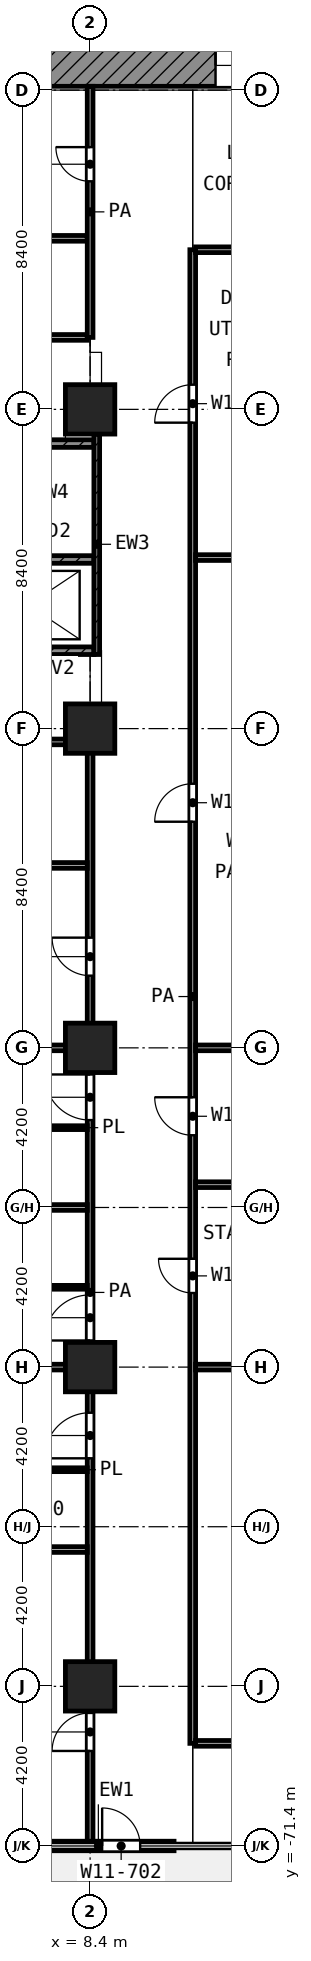
"""IFC4 building model, lengths in metres.
Left out: names, types, materials, properties, quantities, classifications, styles, units other than length and angle.
Written with IfcOpenShell. Run it as: python <this file> out.ifc"""

import sys

from ifc_helpers import new_model, si_unit, direction, frame, frame_2d, origin, origin_2d, place, context, subcontext, project, spatial, rectangle, extrude, element, fill, save


model = new_model("IFC4")
c1 = context("Model", 3, precision=1e-05, world=origin(), true_north=direction((0.0, 1.0)))
c2 = subcontext(c1, "Body", "Model", "MODEL_VIEW")
j1 = project(units=[si_unit("LENGTHUNIT", "METRE"), si_unit("PLANEANGLEUNIT", "RADIAN")], contexts=[c1])
p1 = place(None, origin())
s1 = spatial("IfcSite", under=j1, at=p1, CompositionType="ELEMENT")
p2 = place(p1, origin())
s2 = spatial("IfcBuilding", under=s1, at=p2, CompositionType="ELEMENT")
p3 = place(p2, frame((0.0, 0.0, 72.8)))
s3 = spatial("IfcBuildingStorey", under=s2, at=p3, CompositionType="ELEMENT", Elevation=72.8)
for number, where, z_axis, x_axis in (
    (1, (8.4, -33.6, 0.0), (0.0, 0.0, 1.0), (1.0, 0.0, 0.0)),
    (2, (8.4, -42.0, 0.0), (0.0, 0.0, 1.0), (1.0, 0.0, 0.0)),
    (3, (8.4, -50.4, 0.0), (0.0, 0.0, 1.0), (1.0, 0.0, 0.0)),
    (4, (8.4, -58.8, 0.0), (0.0, 0.0, 1.0), (1.0, 0.0, 0.0)),
    (5, (8.4, -67.2, 0.0), (0.0, 0.0, 1.0), (1.0, 0.0, 0.0)),
):
    element("IfcColumn", number, at=place(p3, frame(where, z_axis=z_axis, x_axis=x_axis)), inside=s3, PredefinedType="COLUMN", context=c2, shape_type="SweptSolid", body=[
        extrude(rectangle(XDim=1.3, YDim=1.3, at=origin_2d()), origin(), (0.0, 0.0, 1.0), 4.2),
    ])
p4 = place(p3, frame((6.625, -71.4, 0.0), z_axis=(0.0, 0.0, 1.0), x_axis=(1.0, 0.0, 0.0)))
e6 = element("IfcWall", 6, at=p4, inside=s3, PredefinedType="SOLIDWALL", context=c2, shape_type="SweptSolid", body=[
    extrude(rectangle(XDim=3.983, YDim=0.25, at=frame_2d((1.992, 0.0))), origin(), (0.0, 0.0, 1.0), 3.78),
])
p5 = place(p4, frame((2.092, 0.0, 0.0)))
e7 = element("IfcOpeningElement", 7, at=p5, cuts=e6, PredefinedType="OPENING", context=c2, shape_type="SweptSolid", body=[
    extrude(rectangle(XDim=1.0, YDim=2.1, at=frame_2d((0.5, 1.05))), frame((0.0, 0.135, 0.0), z_axis=(0.0, -1.0, 0.0), x_axis=(1.0, 0.0, 0.0)), (0.0, 0.0, 1.0), 0.27),
])
p6 = place(p3, frame((5.4, -24.55, 0.0), z_axis=(0.0, 0.0, 1.0), x_axis=(1.0, 0.0, 0.0)))
e8 = element("IfcWall", 8, at=p6, inside=s3, PredefinedType="SHEAR", context=c2, shape_type="SweptSolid", body=[
    extrude(rectangle(XDim=18.6, YDim=1.1, at=frame_2d((9.3, 0.0))), origin(), (0.0, 0.0, 1.0), 3.9),
])
p7 = place(p6, frame((6.3, 0.0, 0.0)))
e9 = element("IfcOpeningElement", 9, at=p7, cuts=e8, PredefinedType="OPENING", context=c2, shape_type="SweptSolid", body=[
    extrude(rectangle(XDim=1.8, YDim=2.1, at=frame_2d((0.9, 1.05))), frame((0.0, 0.56, 0.0), z_axis=(0.0, -1.0, 0.0), x_axis=(1.0, 0.0, 0.0)), (0.0, 0.0, 1.0), 1.12),
])
p8 = place(p3, frame((8.575, -40.05, 0.0), z_axis=(0.0, 0.0, 1.0), x_axis=(0.0, 1.0, 0.0)))
e10 = element("IfcWall", 10, at=p8, inside=s3, PredefinedType="SHEAR", context=c2, shape_type="SweptSolid", body=[
    extrude(rectangle(XDim=5.8, YDim=0.15, at=frame_2d((2.9, 0.0))), origin(), (0.0, 0.0, 1.0), 3.9),
])
p9 = place(p3, frame((0.45, -34.5, 0.0), z_axis=(0.0, 0.0, 1.0), x_axis=(1.0, 0.0, 0.0)))
e11 = element("IfcWall", 11, at=p9, inside=s3, PredefinedType="SHEAR", context=c2, shape_type="SweptSolid", body=[
    extrude(rectangle(XDim=8.05, YDim=0.2, at=frame_2d((4.025, 0.0))), origin(), (0.0, 0.0, 1.0), 3.9),
])
p10 = place(p9, frame((0.75, 0.0, 0.0)))
e12 = element("IfcOpeningElement", 12, at=p10, cuts=e11, PredefinedType="OPENING", context=c2, shape_type="SweptSolid", body=[
    extrude(rectangle(XDim=1.1, YDim=2.1, at=frame_2d((0.55, 1.05))), frame((0.0, 0.11, 0.0), z_axis=(0.0, -1.0, 0.0), x_axis=(1.0, 0.0, 0.0)), (0.0, 0.0, 1.0), 0.22),
])
p11 = place(p3, frame((0.45, -37.55, 0.0), z_axis=(0.0, 0.0, 1.0), x_axis=(1.0, 0.0, 0.0)))
e13 = element("IfcWall", 13, at=p11, inside=s3, PredefinedType="SHEAR", context=c2, shape_type="SweptSolid", body=[
    extrude(rectangle(XDim=8.05, YDim=0.2, at=frame_2d((4.025, 0.0))), origin(), (0.0, 0.0, 1.0), 3.9),
])
p12 = place(p11, frame((0.1, 0.0, 0.0)))
e14 = element("IfcOpeningElement", 14, at=p12, cuts=e13, PredefinedType="OPENING", context=c2, shape_type="SweptSolid", body=[
    extrude(rectangle(XDim=1.1, YDim=2.1, at=frame_2d((0.55, 1.05))), frame((0.0, 0.11, 0.0), z_axis=(0.0, -1.0, 0.0), x_axis=(1.0, 0.0, 0.0)), (0.0, 0.0, 1.0), 0.22),
])
p13 = place(p3, frame((0.45, -39.95, 0.0), z_axis=(0.0, 0.0, 1.0), x_axis=(1.0, 0.0, 0.0)))
e15 = element("IfcWall", 15, at=p13, inside=s3, PredefinedType="SHEAR", context=c2, shape_type="SweptSolid", body=[
    extrude(rectangle(XDim=8.05, YDim=0.2, at=frame_2d((4.025, 0.0))), origin(), (0.0, 0.0, 1.0), 3.9),
])
p14 = place(p13, frame((2.0, 0.0, 0.0)))
e16 = element("IfcOpeningElement", 16, at=p14, cuts=e15, PredefinedType="OPENING", context=c2, shape_type="SweptSolid", body=[
    extrude(rectangle(XDim=1.1, YDim=2.1, at=frame_2d((0.55, 1.05))), frame((0.0, 0.11, 0.0), z_axis=(0.0, -1.0, 0.0), x_axis=(1.0, 0.0, 0.0)), (0.0, 0.0, 1.0), 0.22),
])
p15 = place(p3, frame((5.15, -61.5, 0.0), z_axis=(0.0, 0.0, 1.0), x_axis=(1.0, 0.0, 0.0)))
e17 = element("IfcWall", 17, at=p15, inside=s3, PredefinedType="PARTITIONING", context=c2, shape_type="SweptSolid", body=[
    extrude(rectangle(XDim=3.175, YDim=0.1, at=frame_2d((1.587, 0.0))), origin(), (0.0, 0.0, 1.0), 3.9),
])
for number, where, z_axis, x_axis in (
    (18, (5.75, -56.7, 0.0), (0.0, 0.0, 1.0), (1.0, 0.0, 0.0)),
    (19, (5.75, -52.5, 0.0), (0.0, 0.0, 1.0), (1.0, 0.0, 0.0)),
):
    element("IfcWall", number, at=place(p3, frame(where, z_axis=z_axis, x_axis=x_axis)), inside=s3, PredefinedType="PARTITIONING", context=c2, shape_type="SweptSolid", body=[
        extrude(rectangle(XDim=2.575, YDim=0.1, at=frame_2d((1.288, 0.0))), origin(), (0.0, 0.0, 1.0), 3.9),
    ])
p16 = place(p3, frame((11.175, -68.7, 0.0), z_axis=(0.0, 0.0, 1.0), x_axis=(1.0, 0.0, 0.0)))
e20 = element("IfcWall", 20, at=p16, inside=s3, PredefinedType="PARTITIONING", context=c2, shape_type="SweptSolid", body=[
    extrude(rectangle(XDim=2.85, YDim=0.15, at=frame_2d((1.425, 0.0))), origin(), (0.0, 0.0, 1.0), 3.9),
])
for number, where, z_axis, x_axis in (
    (21, (0.08, -63.6, 0.0), (0.0, 0.0, 1.0), (1.0, 0.0, 0.0)),
    (22, (0.08, -58.8, 0.0), (0.0, 0.0, 1.0), (1.0, 0.0, 0.0)),
):
    element("IfcWall", number, at=place(p3, frame(where, z_axis=z_axis, x_axis=x_axis)), inside=s3, PredefinedType="PARTITIONING", context=c2, shape_type="SweptSolid", body=[
        extrude(rectangle(XDim=8.245, YDim=0.15, at=frame_2d((4.123, 0.0))), origin(), (0.0, 0.0, 1.0), 3.9),
    ])
p17 = place(p3, frame((11.175, -58.8, 0.0), z_axis=(0.0, 0.0, 1.0), x_axis=(1.0, 0.0, 0.0)))
e23 = element("IfcWall", 23, at=p17, inside=s3, PredefinedType="PARTITIONING", context=c2, shape_type="SweptSolid", body=[
    extrude(rectangle(XDim=2.85, YDim=0.15, at=frame_2d((1.425, 0.0))), origin(), (0.0, 0.0, 1.0), 3.9),
])
p18 = place(p3, frame((0.08, -54.6, 0.0), z_axis=(0.0, 0.0, 1.0), x_axis=(1.0, 0.0, 0.0)))
e24 = element("IfcWall", 24, at=p18, inside=s3, PredefinedType="PARTITIONING", context=c2, shape_type="SweptSolid", body=[
    extrude(rectangle(XDim=8.245, YDim=0.15, at=frame_2d((4.123, 0.0))), origin(), (0.0, 0.0, 1.0), 3.9),
])
p19 = place(p3, frame((11.175, -54.0, 0.0), z_axis=(0.0, 0.0, 1.0), x_axis=(1.0, 0.0, 0.0)))
e25 = element("IfcWall", 25, at=p19, inside=s3, PredefinedType="PARTITIONING", context=c2, shape_type="SweptSolid", body=[
    extrude(rectangle(XDim=2.85, YDim=0.15, at=frame_2d((1.425, 0.0))), origin(), (0.0, 0.0, 1.0), 3.9),
])
p20 = place(p3, frame((0.08, -50.4, 0.0), z_axis=(0.0, 0.0, 1.0), x_axis=(1.0, 0.0, 0.0)))
e26 = element("IfcWall", 26, at=p20, inside=s3, PredefinedType="PARTITIONING", context=c2, shape_type="SweptSolid", body=[
    extrude(rectangle(XDim=8.245, YDim=0.15, at=frame_2d((4.123, 0.0))), origin(), (0.0, 0.0, 1.0), 3.9),
])
p21 = place(p3, frame((11.175, -50.4, 0.0), z_axis=(0.0, 0.0, 1.0), x_axis=(1.0, 0.0, 0.0)))
e27 = element("IfcWall", 27, at=p21, inside=s3, PredefinedType="PARTITIONING", context=c2, shape_type="SweptSolid", body=[
    extrude(rectangle(XDim=2.85, YDim=0.15, at=frame_2d((1.425, 0.0))), origin(), (0.0, 0.0, 1.0), 3.9),
])
p22 = place(p3, frame((0.08, -45.6, 0.0), z_axis=(0.0, 0.0, 1.0), x_axis=(1.0, 0.0, 0.0)))
e28 = element("IfcWall", 28, at=p22, inside=s3, PredefinedType="PARTITIONING", context=c2, shape_type="SweptSolid", body=[
    extrude(rectangle(XDim=8.245, YDim=0.15, at=frame_2d((4.123, 0.0))), origin(), (0.0, 0.0, 1.0), 3.9),
])
p23 = place(p3, frame((2.327, -42.35, 0.0), z_axis=(0.0, 0.0, 1.0), x_axis=(1.0, 0.0, 0.0)))
e29 = element("IfcWall", 29, at=p23, inside=s3, PredefinedType="PARTITIONING", context=c2, shape_type="SweptSolid", body=[
    extrude(rectangle(XDim=5.998, YDim=0.15, at=frame_2d((2.999, 0.0))), origin(), (0.0, 0.0, 1.0), 3.9),
])
p24 = place(p23, frame((2.499, 0.0, 0.0)))
e30 = element("IfcOpeningElement", 30, at=p24, cuts=e29, PredefinedType="OPENING", context=c2, shape_type="SweptSolid", body=[
    extrude(rectangle(XDim=1.0, YDim=2.1, at=frame_2d((0.5, 1.05))), frame((0.0, 0.085, 0.0), z_axis=(0.0, -1.0, 0.0), x_axis=(1.0, 0.0, 0.0)), (0.0, 0.0, 1.0), 0.17),
])
p25 = place(p3, frame((11.175, -37.5, 0.0), z_axis=(0.0, 0.0, 1.0), x_axis=(1.0, 0.0, 0.0)))
e31 = element("IfcWall", 31, at=p25, inside=s3, PredefinedType="PARTITIONING", context=c2, shape_type="SweptSolid", body=[
    extrude(rectangle(XDim=2.85, YDim=0.15, at=frame_2d((1.425, 0.0))), origin(), (0.0, 0.0, 1.0), 3.9),
])
p26 = place(p3, frame((1.077, -31.707, 0.0), z_axis=(0.0, 0.0, 1.0), x_axis=(1.0, 0.0, 0.0)))
e32 = element("IfcWall", 32, at=p26, inside=s3, PredefinedType="PARTITIONING", context=c2, shape_type="SweptSolid", body=[
    extrude(rectangle(XDim=7.248, YDim=0.15, at=frame_2d((3.624, 0.0))), origin(), (0.0, 0.0, 1.0), 3.9),
])
p27 = place(p26, frame((3.024, 0.0, 0.0)))
e33 = element("IfcOpeningElement", 33, at=p27, cuts=e32, PredefinedType="OPENING", context=c2, shape_type="SweptSolid", body=[
    extrude(rectangle(XDim=1.2, YDim=2.1, at=frame_2d((0.6, 1.05))), frame((0.0, 0.085, 0.0), z_axis=(0.0, -1.0, 0.0), x_axis=(1.0, 0.0, 0.0)), (0.0, 0.0, 1.0), 0.17),
])
p28 = place(p3, frame((11.175, -29.4, 0.0), z_axis=(0.0, 0.0, 1.0), x_axis=(1.0, 0.0, 0.0)))
e34 = element("IfcWall", 34, at=p28, inside=s3, PredefinedType="PARTITIONING", context=c2, shape_type="SweptSolid", body=[
    extrude(rectangle(XDim=2.85, YDim=0.15, at=frame_2d((1.425, 0.0))), origin(), (0.0, 0.0, 1.0), 3.9),
])
p29 = place(p3, frame((0.08, -29.1, 0.0), z_axis=(0.0, 0.0, 1.0), x_axis=(1.0, 0.0, 0.0)))
e35 = element("IfcWall", 35, at=p29, inside=s3, PredefinedType="PARTITIONING", context=c2, shape_type="SweptSolid", body=[
    extrude(rectangle(XDim=8.245, YDim=0.15, at=frame_2d((4.123, 0.0))), origin(), (0.0, 0.0, 1.0), 3.9),
])
p30 = place(p3, frame((8.4, -71.32, 0.0), z_axis=(0.0, 0.0, 1.0), x_axis=(0.0, 1.0, 0.0)))
e36 = element("IfcWall", 36, at=p30, inside=s3, PredefinedType="PARTITIONING", context=c2, shape_type="SweptSolid", body=[
    extrude(rectangle(XDim=28.97, YDim=0.15, at=frame_2d((14.485, 0.0))), origin(), (0.0, 0.0, 1.0), 3.9),
])
p31 = place(p30, frame((22.82, 0.0, 0.0)))
e37 = element("IfcOpeningElement", 37, at=p31, cuts=e36, PredefinedType="OPENING", context=c2, shape_type="SweptSolid", body=[
    extrude(rectangle(XDim=1.0, YDim=2.1, at=frame_2d((0.5, 1.05))), frame((0.0, 0.085, 0.0), z_axis=(0.0, -1.0, 0.0), x_axis=(1.0, 0.0, 0.0)), (0.0, 0.0, 1.0), 0.17),
])
p32 = place(p30, frame((19.02, 0.0, 0.0)))
e38 = element("IfcOpeningElement", 38, at=p32, cuts=e36, PredefinedType="OPENING", context=c2, shape_type="SweptSolid", body=[
    extrude(rectangle(XDim=1.2, YDim=2.1, at=frame_2d((0.6, 1.05))), frame((0.0, 0.085, 0.0), z_axis=(0.0, -1.0, 0.0), x_axis=(1.0, 0.0, 0.0)), (0.0, 0.0, 1.0), 0.17),
])
p33 = place(p30, frame((13.22, 0.0, 0.0)))
e39 = element("IfcOpeningElement", 39, at=p33, cuts=e36, PredefinedType="OPENING", context=c2, shape_type="SweptSolid", body=[
    extrude(rectangle(XDim=1.2, YDim=2.1, at=frame_2d((0.6, 1.05))), frame((0.0, 0.085, 0.0), z_axis=(0.0, -1.0, 0.0), x_axis=(1.0, 0.0, 0.0)), (0.0, 0.0, 1.0), 0.17),
])
p34 = place(p30, frame((10.12, 0.0, 0.0)))
e40 = element("IfcOpeningElement", 40, at=p34, cuts=e36, PredefinedType="OPENING", context=c2, shape_type="SweptSolid", body=[
    extrude(rectangle(XDim=1.2, YDim=2.1, at=frame_2d((0.6, 1.05))), frame((0.0, 0.085, 0.0), z_axis=(0.0, -1.0, 0.0), x_axis=(1.0, 0.0, 0.0)), (0.0, 0.0, 1.0), 0.17),
])
p35 = place(p30, frame((2.42, 0.0, 0.0)))
e41 = element("IfcOpeningElement", 41, at=p35, cuts=e36, PredefinedType="OPENING", context=c2, shape_type="SweptSolid", body=[
    extrude(rectangle(XDim=1.0, YDim=2.1, at=frame_2d((0.5, 1.05))), frame((0.0, 0.085, 0.0), z_axis=(0.0, -1.0, 0.0), x_axis=(1.0, 0.0, 0.0)), (0.0, 0.0, 1.0), 0.17),
])
p36 = place(p3, frame((8.4, -31.707, 0.0), z_axis=(0.0, 0.0, 1.0), x_axis=(0.0, 1.0, 0.0)))
e42 = element("IfcWall", 42, at=p36, inside=s3, PredefinedType="PARTITIONING", context=c2, shape_type="SweptSolid", body=[
    extrude(rectangle(XDim=6.607, YDim=0.15, at=frame_2d((3.303, 0.0))), origin(), (0.0, 0.0, 1.0), 3.9),
])
p37 = place(p36, frame((4.107, 0.0, 0.0)))
e43 = element("IfcOpeningElement", 43, at=p37, cuts=e42, PredefinedType="OPENING", context=c2, shape_type="SweptSolid", body=[
    extrude(rectangle(XDim=0.9, YDim=2.1, at=frame_2d((0.45, 1.05))), frame((0.0, 0.085, 0.0), z_axis=(0.0, -1.0, 0.0), x_axis=(1.0, 0.0, 0.0)), (0.0, 0.0, 1.0), 0.17),
])
p38 = place(p3, frame((11.1, -68.7, 0.0), z_axis=(0.0, 0.0, 1.0), x_axis=(0.0, 1.0, 0.0)))
e44 = element("IfcWall", 44, at=p38, inside=s3, PredefinedType="PARTITIONING", context=c2, shape_type="SweptSolid", body=[
    extrude(rectangle(XDim=39.3, YDim=0.15, at=frame_2d((19.65, 0.0))), origin(), (0.0, 0.0, 1.0), 3.9),
])
p39 = place(p38, frame((34.75, 0.0, 0.0)))
e45 = element("IfcOpeningElement", 45, at=p39, cuts=e44, PredefinedType="OPENING", context=c2, shape_type="SweptSolid", body=[
    extrude(rectangle(XDim=1.0, YDim=2.1, at=frame_2d((0.5, 1.05))), frame((0.0, 0.085, 0.0), z_axis=(0.0, -1.0, 0.0), x_axis=(1.0, 0.0, 0.0)), (0.0, 0.0, 1.0), 0.17),
])
p40 = place(p38, frame((24.25, 0.0, 0.0)))
e46 = element("IfcOpeningElement", 46, at=p40, cuts=e44, PredefinedType="OPENING", context=c2, shape_type="SweptSolid", body=[
    extrude(rectangle(XDim=1.0, YDim=2.1, at=frame_2d((0.5, 1.05))), frame((0.0, 0.085, 0.0), z_axis=(0.0, -1.0, 0.0), x_axis=(1.0, 0.0, 0.0)), (0.0, 0.0, 1.0), 0.17),
])
p41 = place(p38, frame((16.0, 0.0, 0.0)))
e47 = element("IfcOpeningElement", 47, at=p41, cuts=e44, PredefinedType="OPENING", context=c2, shape_type="SweptSolid", body=[
    extrude(rectangle(XDim=1.0, YDim=2.1, at=frame_2d((0.5, 1.05))), frame((0.0, 0.085, 0.0), z_axis=(0.0, -1.0, 0.0), x_axis=(1.0, 0.0, 0.0)), (0.0, 0.0, 1.0), 0.17),
])
p42 = place(p38, frame((11.85, 0.0, 0.0)))
e48 = element("IfcOpeningElement", 48, at=p42, cuts=e44, PredefinedType="OPENING", context=c2, shape_type="SweptSolid", body=[
    extrude(rectangle(XDim=0.9, YDim=2.1, at=frame_2d((0.45, 1.05))), frame((0.0, 0.085, 0.0), z_axis=(0.0, -1.0, 0.0), x_axis=(1.0, 0.0, 0.0)), (0.0, 0.0, 1.0), 0.17),
])
p43 = place(p5, origin())
e49 = element("IfcDoor", 49, at=p43, inside=s3, OperationType="SINGLE_SWING_LEFT", PredefinedType="DOOR", context=c2, shape_type="SweptSolid", body=[
    extrude(rectangle(XDim=1.0, YDim=2.1, at=frame_2d((0.5, 1.05))), frame((0.0, 0.025, 0.0), z_axis=(0.0, -1.0, 0.0), x_axis=(1.0, 0.0, 0.0)), (0.0, 0.0, 1.0), 0.05),
])
fill(e7, e49)
p44 = place(p7, origin())
e50 = element("IfcDoor", 50, at=p44, inside=s3, OperationType="DOUBLE_DOOR_SINGLE_SWING", PredefinedType="DOOR", context=c2, shape_type="SweptSolid", body=[
    extrude(rectangle(XDim=1.8, YDim=2.1, at=frame_2d((0.9, 1.05))), frame((0.0, 0.025, 0.0), z_axis=(0.0, -1.0, 0.0), x_axis=(1.0, 0.0, 0.0)), (0.0, 0.0, 1.0), 0.05),
])
fill(e9, e50)
p45 = place(p37, origin())
e51 = element("IfcDoor", 51, at=p45, inside=s3, OperationType="SINGLE_SWING_RIGHT", PredefinedType="DOOR", context=c2, shape_type="SweptSolid", body=[
    extrude(rectangle(XDim=0.9, YDim=2.1, at=frame_2d((0.45, 1.05))), frame((0.0, 0.025, 0.0), z_axis=(0.0, -1.0, 0.0), x_axis=(1.0, 0.0, 0.0)), (0.0, 0.0, 1.0), 0.05),
])
fill(e43, e51)
p46 = place(p31, origin())
e52 = element("IfcDoor", 52, at=p46, inside=s3, OperationType="SINGLE_SWING_RIGHT", PredefinedType="DOOR", context=c2, shape_type="SweptSolid", body=[
    extrude(rectangle(XDim=1.0, YDim=2.1, at=frame_2d((0.5, 1.05))), frame((0.0, 0.025, 0.0), z_axis=(0.0, -1.0, 0.0), x_axis=(1.0, 0.0, 0.0)), (0.0, 0.0, 1.0), 0.05),
])
fill(e37, e52)
p47 = place(p32, origin())
e53 = element("IfcDoor", 53, at=p47, inside=s3, OperationType="SINGLE_SWING_RIGHT", PredefinedType="DOOR", context=c2, shape_type="SweptSolid", body=[
    extrude(rectangle(XDim=1.2, YDim=2.1, at=frame_2d((0.6, 1.05))), frame((0.0, 0.025, 0.0), z_axis=(0.0, -1.0, 0.0), x_axis=(1.0, 0.0, 0.0)), (0.0, 0.0, 1.0), 0.05),
])
fill(e38, e53)
p48 = place(p33, origin())
e54 = element("IfcDoor", 54, at=p48, inside=s3, OperationType="SINGLE_SWING_LEFT", PredefinedType="DOOR", context=c2, shape_type="SweptSolid", body=[
    extrude(rectangle(XDim=1.2, YDim=2.1, at=frame_2d((0.6, 1.05))), frame((0.0, 0.025, 0.0), z_axis=(0.0, -1.0, 0.0), x_axis=(1.0, 0.0, 0.0)), (0.0, 0.0, 1.0), 0.05),
])
fill(e39, e54)
p49 = place(p34, origin())
e55 = element("IfcDoor", 55, at=p49, inside=s3, OperationType="SINGLE_SWING_LEFT", PredefinedType="DOOR", context=c2, shape_type="SweptSolid", body=[
    extrude(rectangle(XDim=1.2, YDim=2.1, at=frame_2d((0.6, 1.05))), frame((0.0, 0.025, 0.0), z_axis=(0.0, -1.0, 0.0), x_axis=(1.0, 0.0, 0.0)), (0.0, 0.0, 1.0), 0.05),
])
fill(e40, e55)
p50 = place(p35, origin())
e56 = element("IfcDoor", 56, at=p50, inside=s3, OperationType="SINGLE_SWING_LEFT", PredefinedType="DOOR", context=c2, shape_type="SweptSolid", body=[
    extrude(rectangle(XDim=1.0, YDim=2.1, at=frame_2d((0.5, 1.05))), frame((0.0, 0.025, 0.0), z_axis=(0.0, -1.0, 0.0), x_axis=(1.0, 0.0, 0.0)), (0.0, 0.0, 1.0), 0.05),
])
fill(e41, e56)
p51 = place(p39, origin())
e57 = element("IfcDoor", 57, at=p51, inside=s3, OperationType="SINGLE_SWING_LEFT", PredefinedType="DOOR", context=c2, shape_type="SweptSolid", body=[
    extrude(rectangle(XDim=1.0, YDim=2.1, at=frame_2d((0.5, 1.05))), frame((0.0, 0.025, 0.0), z_axis=(0.0, -1.0, 0.0), x_axis=(1.0, 0.0, 0.0)), (0.0, 0.0, 1.0), 0.05),
])
fill(e45, e57)
p52 = place(p40, origin())
e58 = element("IfcDoor", 58, at=p52, inside=s3, OperationType="SINGLE_SWING_LEFT", PredefinedType="DOOR", context=c2, shape_type="SweptSolid", body=[
    extrude(rectangle(XDim=1.0, YDim=2.1, at=frame_2d((0.5, 1.05))), frame((0.0, 0.025, 0.0), z_axis=(0.0, -1.0, 0.0), x_axis=(1.0, 0.0, 0.0)), (0.0, 0.0, 1.0), 0.05),
])
fill(e46, e58)
p53 = place(p41, origin())
e59 = element("IfcDoor", 59, at=p53, inside=s3, OperationType="SINGLE_SWING_RIGHT", PredefinedType="DOOR", context=c2, shape_type="SweptSolid", body=[
    extrude(rectangle(XDim=1.0, YDim=2.1, at=frame_2d((0.5, 1.05))), frame((0.0, 0.025, 0.0), z_axis=(0.0, -1.0, 0.0), x_axis=(1.0, 0.0, 0.0)), (0.0, 0.0, 1.0), 0.05),
])
fill(e47, e59)
p54 = place(p42, origin())
e60 = element("IfcDoor", 60, at=p54, inside=s3, OperationType="SINGLE_SWING_RIGHT", PredefinedType="DOOR", context=c2, shape_type="SweptSolid", body=[
    extrude(rectangle(XDim=0.9, YDim=2.1, at=frame_2d((0.45, 1.05))), frame((0.0, 0.025, 0.0), z_axis=(0.0, -1.0, 0.0), x_axis=(1.0, 0.0, 0.0)), (0.0, 0.0, 1.0), 0.05),
])
fill(e48, e60)
save(model, sys.argv[1])
